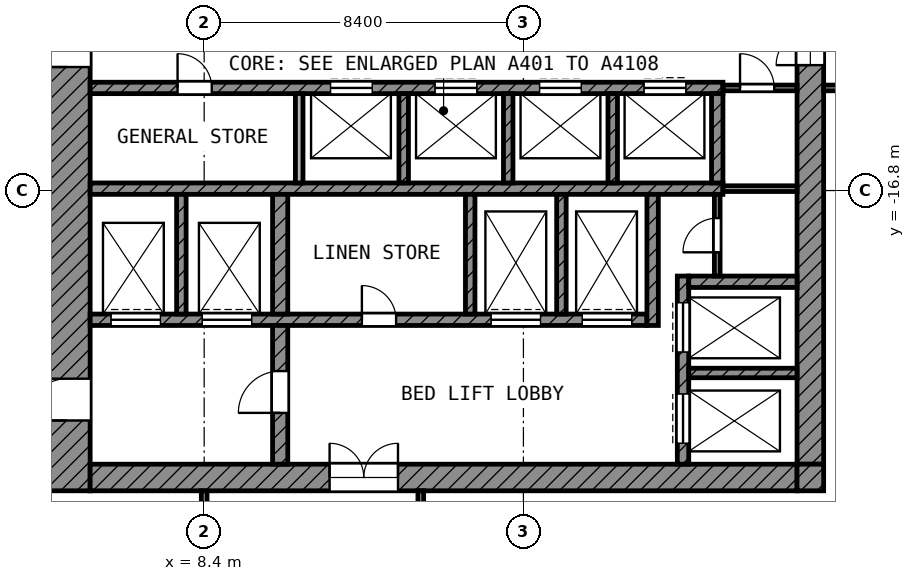
"""IFC4 building model, lengths in metres.
Left out: names, types, materials, properties, quantities, classifications, styles, units other than length and angle.
Written with IfcOpenShell. Run it as: python <this file> out.ifc"""

import sys

from ifc_helpers import new_model, si_unit, direction, frame, frame_2d, origin, place, context, subcontext, project, spatial, rectangle, extrude, element, fill, save


model = new_model("IFC4")
c1 = context("Model", 3, precision=1e-05, world=origin(), true_north=direction((0.0, 1.0)))
c2 = subcontext(c1, "Body", "Model", "MODEL_VIEW")
j1 = project(units=[si_unit("LENGTHUNIT", "METRE"), si_unit("PLANEANGLEUNIT", "RADIAN")], contexts=[c1])
p1 = place(None, origin())
s1 = spatial("IfcSite", under=j1, at=p1, CompositionType="ELEMENT")
p2 = place(p1, origin())
s2 = spatial("IfcBuilding", under=s1, at=p2, CompositionType="ELEMENT")
p3 = place(p2, frame((0.0, 0.0, 290.2)))
s3 = spatial("IfcBuildingStorey", under=s2, at=p3, CompositionType="ELEMENT", Elevation=290.2)
p4 = place(p3, frame((4.8, -24.7, 0.0), z_axis=(0.0, 0.0, 1.0), x_axis=(0.0, 1.0, 0.0)))
e1 = element("IfcWall", 1, at=p4, inside=s3, PredefinedType="SHEAR", context=c2, shape_type="SweptSolid", body=[
    extrude(rectangle(XDim=19.3, YDim=1.2, at=frame_2d((9.65, 0.0))), origin(), (0.0, 0.0, 1.0), 3.6),
])
p5 = place(p4, frame((11.15, 0.0, 0.0)))
e2 = element("IfcOpeningElement", 2, at=p5, cuts=e1, PredefinedType="OPENING", context=c2, shape_type="SweptSolid", body=[
    extrude(rectangle(XDim=1.1, YDim=2.1, at=frame_2d((0.55, 1.05))), frame((0.0, 0.61, 0.0), z_axis=(0.0, -1.0, 0.0), x_axis=(1.0, 0.0, 0.0)), (0.0, 0.0, 1.0), 1.22),
])
p6 = place(p4, frame((1.85, 0.0, 0.0)))
e3 = element("IfcOpeningElement", 3, at=p6, cuts=e1, PredefinedType="OPENING", context=c2, shape_type="SweptSolid", body=[
    extrude(rectangle(XDim=1.1, YDim=2.1, at=frame_2d((0.55, 1.05))), frame((0.0, 0.61, 0.0), z_axis=(0.0, -1.0, 0.0), x_axis=(1.0, 0.0, 0.0)), (0.0, 0.0, 1.0), 1.22),
])
p7 = place(p3, frame((24.35, -24.0, 0.0), z_axis=(0.0, 0.0, 1.0), x_axis=(0.0, 1.0, 0.0)))
e4 = element("IfcWall", 4, at=p7, inside=s3, PredefinedType="SHEAR", context=c2, shape_type="SweptSolid", body=[
    extrude(rectangle(XDim=18.6, YDim=0.7, at=frame_2d((9.3, 0.0))), origin(), (0.0, 0.0, 1.0), 3.6),
])
p8 = place(p7, frame((10.5, 0.0, 0.0)))
e5 = element("IfcOpeningElement", 5, at=p8, cuts=e4, PredefinedType="OPENING", context=c2, shape_type="SweptSolid", body=[
    extrude(rectangle(XDim=1.8, YDim=2.1, at=frame_2d((0.9, 1.05))), frame((0.0, 0.36, 0.0), z_axis=(0.0, -1.0, 0.0), x_axis=(1.0, 0.0, 0.0)), (0.0, 0.0, 1.0), 0.72),
])
p9 = place(p3, frame((5.4, -24.35, 0.0), z_axis=(0.0, 0.0, 1.0), x_axis=(1.0, 0.0, 0.0)))
e6 = element("IfcWall", 6, at=p9, inside=s3, PredefinedType="SHEAR", context=c2, shape_type="SweptSolid", body=[
    extrude(rectangle(XDim=18.6, YDim=0.7, at=frame_2d((9.3, 0.0))), origin(), (0.0, 0.0, 1.0), 3.6),
])
p10 = place(p9, frame((6.3, 0.0, 0.0)))
e7 = element("IfcOpeningElement", 7, at=p10, cuts=e6, PredefinedType="OPENING", context=c2, shape_type="SweptSolid", body=[
    extrude(rectangle(XDim=1.8, YDim=2.1, at=frame_2d((0.9, 1.05))), frame((0.0, 0.36, 0.0), z_axis=(0.0, -1.0, 0.0), x_axis=(1.0, 0.0, 0.0)), (0.0, 0.0, 1.0), 0.72),
])
p11 = place(p3, frame((24.35, -24.7, 0.0), z_axis=(0.0, 0.0, 1.0), x_axis=(0.0, 1.0, 0.0)))
e8 = element("IfcWall", 8, at=p11, inside=s3, PredefinedType="SHEAR", context=c2, shape_type="SweptSolid", body=[
    extrude(rectangle(XDim=0.7, YDim=0.7, at=frame_2d((0.35, 0.0))), origin(), (0.0, 0.0, 1.0), 3.6),
])
p12 = place(p3, frame((5.4, -14.1, 0.0), z_axis=(0.0, 0.0, 1.0), x_axis=(1.0, 0.0, 0.0)))
e9 = element("IfcWall", 9, at=p12, inside=s3, PredefinedType="SHEAR", context=c2, shape_type="SweptSolid", body=[
    extrude(rectangle(XDim=16.65, YDim=0.3, at=frame_2d((8.325, 0.0))), origin(), (0.0, 0.0, 1.0), 3.6),
])
p13 = place(p12, frame((6.325, 0.0, 0.0)))
e10 = element("IfcOpeningElement", 10, at=p13, cuts=e9, PredefinedType="OPENING", context=c2, shape_type="SweptSolid", body=[
    extrude(rectangle(XDim=1.1, YDim=2.1, at=frame_2d((0.55, 1.05))), frame((0.0, 0.16, 0.0), z_axis=(0.0, -1.0, 0.0), x_axis=(1.0, 0.0, 0.0)), (0.0, 0.0, 1.0), 0.32),
])
p14 = place(p12, frame((9.075, 0.0, 0.0)))
e11 = element("IfcOpeningElement", 11, at=p14, cuts=e9, PredefinedType="OPENING", context=c2, shape_type="SweptSolid", body=[
    extrude(rectangle(XDim=1.1, YDim=2.1, at=frame_2d((0.55, 1.05))), frame((0.0, 0.16, 0.0), z_axis=(0.0, -1.0, 0.0), x_axis=(1.0, 0.0, 0.0)), (0.0, 0.0, 1.0), 0.32),
])
p15 = place(p12, frame((11.825, 0.0, 0.0)))
e12 = element("IfcOpeningElement", 12, at=p15, cuts=e9, PredefinedType="OPENING", context=c2, shape_type="SweptSolid", body=[
    extrude(rectangle(XDim=1.1, YDim=2.1, at=frame_2d((0.55, 1.05))), frame((0.0, 0.16, 0.0), z_axis=(0.0, -1.0, 0.0), x_axis=(1.0, 0.0, 0.0)), (0.0, 0.0, 1.0), 0.32),
])
p16 = place(p12, frame((14.575, 0.0, 0.0)))
e13 = element("IfcOpeningElement", 13, at=p16, cuts=e9, PredefinedType="OPENING", context=c2, shape_type="SweptSolid", body=[
    extrude(rectangle(XDim=1.1, YDim=2.1, at=frame_2d((0.55, 1.05))), frame((0.0, 0.16, 0.0), z_axis=(0.0, -1.0, 0.0), x_axis=(1.0, 0.0, 0.0)), (0.0, 0.0, 1.0), 0.32),
])
p17 = place(p12, frame((2.3, 0.0, 0.0)))
e14 = element("IfcOpeningElement", 14, at=p17, cuts=e9, PredefinedType="OPENING", context=c2, shape_type="SweptSolid", body=[
    extrude(rectangle(XDim=0.9, YDim=2.1, at=frame_2d((0.45, 1.05))), frame((0.0, 0.16, 0.0), z_axis=(0.0, -1.0, 0.0), x_axis=(1.0, 0.0, 0.0)), (0.0, 0.0, 1.0), 0.32),
])
p18 = place(p3, frame((5.4, -16.75, 0.0), z_axis=(0.0, 0.0, 1.0), x_axis=(1.0, 0.0, 0.0)))
e15 = element("IfcWall", 15, at=p18, inside=s3, PredefinedType="SHEAR", context=c2, shape_type="SweptSolid", body=[
    extrude(rectangle(XDim=16.65, YDim=0.3, at=frame_2d((8.325, 0.0))), origin(), (0.0, 0.0, 1.0), 3.6),
])
p19 = place(p3, frame((5.4, -20.2, 0.0), z_axis=(0.0, 0.0, 1.0), x_axis=(1.0, 0.0, 0.0)))
e16 = element("IfcWall", 16, at=p19, inside=s3, PredefinedType="SHEAR", context=c2, shape_type="SweptSolid", body=[
    extrude(rectangle(XDim=14.65, YDim=0.3, at=frame_2d((7.325, 0.0))), origin(), (0.0, 0.0, 1.0), 3.6),
])
p20 = place(p19, frame((10.55, 0.0, 0.0)))
e17 = element("IfcOpeningElement", 17, at=p20, cuts=e16, PredefinedType="OPENING", context=c2, shape_type="SweptSolid", body=[
    extrude(rectangle(XDim=1.3, YDim=2.1, at=frame_2d((0.65, 1.05))), frame((0.0, 0.16, 0.0), z_axis=(0.0, -1.0, 0.0), x_axis=(1.0, 0.0, 0.0)), (0.0, 0.0, 1.0), 0.32),
])
p21 = place(p19, frame((12.95, 0.0, 0.0)))
e18 = element("IfcOpeningElement", 18, at=p21, cuts=e16, PredefinedType="OPENING", context=c2, shape_type="SweptSolid", body=[
    extrude(rectangle(XDim=1.3, YDim=2.1, at=frame_2d((0.65, 1.05))), frame((0.0, 0.16, 0.0), z_axis=(0.0, -1.0, 0.0), x_axis=(1.0, 0.0, 0.0)), (0.0, 0.0, 1.0), 0.32),
])
p22 = place(p19, frame((0.55, 0.0, 0.0)))
e19 = element("IfcOpeningElement", 19, at=p22, cuts=e16, PredefinedType="OPENING", context=c2, shape_type="SweptSolid", body=[
    extrude(rectangle(XDim=1.3, YDim=2.1, at=frame_2d((0.65, 1.05))), frame((0.0, 0.16, 0.0), z_axis=(0.0, -1.0, 0.0), x_axis=(1.0, 0.0, 0.0)), (0.0, 0.0, 1.0), 0.32),
])
p23 = place(p19, frame((2.95, 0.0, 0.0)))
e20 = element("IfcOpeningElement", 20, at=p23, cuts=e16, PredefinedType="OPENING", context=c2, shape_type="SweptSolid", body=[
    extrude(rectangle(XDim=1.3, YDim=2.1, at=frame_2d((0.65, 1.05))), frame((0.0, 0.16, 0.0), z_axis=(0.0, -1.0, 0.0), x_axis=(1.0, 0.0, 0.0)), (0.0, 0.0, 1.0), 0.32),
])
p24 = place(p19, frame((7.15, 0.0, 0.0)))
e21 = element("IfcOpeningElement", 21, at=p24, cuts=e16, PredefinedType="OPENING", context=c2, shape_type="SweptSolid", body=[
    extrude(rectangle(XDim=0.9, YDim=2.1, at=frame_2d((0.45, 1.05))), frame((0.0, 0.16, 0.0), z_axis=(0.0, -1.0, 0.0), x_axis=(1.0, 0.0, 0.0)), (0.0, 0.0, 1.0), 0.32),
])
p25 = place(p3, frame((10.4, -24.0, 0.0), z_axis=(0.0, 0.0, 1.0), x_axis=(0.0, 1.0, 0.0)))
e22 = element("IfcWall", 22, at=p25, inside=s3, PredefinedType="SHEAR", context=c2, shape_type="SweptSolid", body=[
    extrude(rectangle(XDim=3.65, YDim=0.4, at=frame_2d((1.825, 0.0))), origin(), (0.0, 0.0, 1.0), 3.6),
])
p26 = place(p25, frame((1.35, 0.0, 0.0)))
e23 = element("IfcOpeningElement", 23, at=p26, cuts=e22, PredefinedType="OPENING", context=c2, shape_type="SweptSolid", body=[
    extrude(rectangle(XDim=1.1, YDim=2.1, at=frame_2d((0.55, 1.05))), frame((0.0, 0.21, 0.0), z_axis=(0.0, -1.0, 0.0), x_axis=(1.0, 0.0, 0.0)), (0.0, 0.0, 1.0), 0.42),
])
p27 = place(p3, frame((10.4, -20.05, 0.0), z_axis=(0.0, 0.0, 1.0), x_axis=(0.0, 1.0, 0.0)))
e24 = element("IfcWall", 24, at=p27, inside=s3, PredefinedType="SHEAR", context=c2, shape_type="SweptSolid", body=[
    extrude(rectangle(XDim=3.15, YDim=0.4, at=frame_2d((1.575, 0.0))), origin(), (0.0, 0.0, 1.0), 3.6),
])
p28 = place(p3, frame((20.2, -20.35, 0.0), z_axis=(0.0, 0.0, 1.0), x_axis=(0.0, 1.0, 0.0)))
e25 = element("IfcWall", 25, at=p28, inside=s3, PredefinedType="SHEAR", context=c2, shape_type="SweptSolid", body=[
    extrude(rectangle(XDim=3.45, YDim=0.3, at=frame_2d((1.725, 0.0))), origin(), (0.0, 0.0, 1.0), 3.6),
])
p29 = place(p3, frame((21.9, -16.6, 0.0), z_axis=(0.0, 0.0, 1.0), x_axis=(0.0, 1.0, 0.0)))
e26 = element("IfcWall", 26, at=p29, inside=s3, PredefinedType="SHEAR", context=c2, shape_type="SweptSolid", body=[
    extrude(rectangle(XDim=2.35, YDim=0.3, at=frame_2d((1.175, 0.0))), origin(), (0.0, 0.0, 1.0), 3.6),
])
p30 = place(p3, frame((21.15, -19.2, 0.0), z_axis=(0.0, 0.0, 1.0), x_axis=(1.0, 0.0, 0.0)))
e27 = element("IfcWall", 27, at=p30, inside=s3, PredefinedType="SHEAR", context=c2, shape_type="SweptSolid", body=[
    extrude(rectangle(XDim=2.85, YDim=0.3, at=frame_2d((1.425, 0.0))), origin(), (0.0, 0.0, 1.0), 3.6),
])
p31 = place(p3, frame((21.0, -24.0, 0.0), z_axis=(0.0, 0.0, 1.0), x_axis=(0.0, 1.0, 0.0)))
e28 = element("IfcWall", 28, at=p31, inside=s3, PredefinedType="SHEAR", context=c2, shape_type="SweptSolid", body=[
    extrude(rectangle(XDim=4.95, YDim=0.3, at=frame_2d((2.475, 0.0))), origin(), (0.0, 0.0, 1.0), 3.6),
])
p32 = place(p31, frame((2.95, 0.0, 0.0)))
e29 = element("IfcOpeningElement", 29, at=p32, cuts=e28, PredefinedType="OPENING", context=c2, shape_type="SweptSolid", body=[
    extrude(rectangle(XDim=1.3, YDim=2.1, at=frame_2d((0.65, 1.05))), frame((0.0, 0.16, 0.0), z_axis=(0.0, -1.0, 0.0), x_axis=(1.0, 0.0, 0.0)), (0.0, 0.0, 1.0), 0.32),
])
p33 = place(p31, frame((0.55, 0.0, 0.0)))
e30 = element("IfcOpeningElement", 30, at=p33, cuts=e28, PredefinedType="OPENING", context=c2, shape_type="SweptSolid", body=[
    extrude(rectangle(XDim=1.3, YDim=2.1, at=frame_2d((0.65, 1.05))), frame((0.0, 0.16, 0.0), z_axis=(0.0, -1.0, 0.0), x_axis=(1.0, 0.0, 0.0)), (0.0, 0.0, 1.0), 0.32),
])
p34 = place(p3, frame((21.15, -21.6, 0.0), z_axis=(0.0, 0.0, 1.0), x_axis=(1.0, 0.0, 0.0)))
e31 = element("IfcWall", 31, at=p34, inside=s3, PredefinedType="SHEAR", context=c2, shape_type="SweptSolid", body=[
    extrude(rectangle(XDim=2.85, YDim=0.25, at=frame_2d((1.425, 0.0))), origin(), (0.0, 0.0, 1.0), 3.6),
])
for number, where, z_axis, x_axis in (
    (32, (7.8, -20.05, 0.0), (0.0, 0.0, 1.0), (0.0, 1.0, 0.0)),
    (33, (15.4, -20.05, 0.0), (0.0, 0.0, 1.0), (0.0, 1.0, 0.0)),
    (34, (17.8, -20.05, 0.0), (0.0, 0.0, 1.0), (0.0, 1.0, 0.0)),
):
    element("IfcWall", number, at=place(p3, frame(where, z_axis=z_axis, x_axis=x_axis)), inside=s3, PredefinedType="SHEAR", context=c2, shape_type="SweptSolid", body=[
        extrude(rectangle(XDim=3.15, YDim=0.25, at=frame_2d((1.575, 0.0))), origin(), (0.0, 0.0, 1.0), 3.6),
    ])
p35 = place(p3, frame((10.9, -16.6, 0.0), z_axis=(0.0, 0.0, 1.0), x_axis=(0.0, 1.0, 0.0)))
e35 = element("IfcWall", 35, at=p35, inside=s3, PredefinedType="PARTITIONING", context=c2, shape_type="SweptSolid", body=[
    extrude(rectangle(XDim=2.35, YDim=0.2, at=frame_2d((1.175, 0.0))), origin(), (0.0, 0.0, 1.0), 3.6),
])
for number, where, z_axis, x_axis in (
    (36, (13.65, -16.6, 0.0), (0.0, 0.0, 1.0), (0.0, 1.0, 0.0)),
    (37, (16.4, -16.6, 0.0), (0.0, 0.0, 1.0), (0.0, 1.0, 0.0)),
    (38, (19.15, -16.6, 0.0), (0.0, 0.0, 1.0), (0.0, 1.0, 0.0)),
):
    element("IfcWall", number, at=place(p3, frame(where, z_axis=z_axis, x_axis=x_axis)), inside=s3, PredefinedType="SHEAR", context=c2, shape_type="SweptSolid", body=[
        extrude(rectangle(XDim=2.35, YDim=0.25, at=frame_2d((1.175, 0.0))), origin(), (0.0, 0.0, 1.0), 3.6),
    ])
p36 = place(p3, frame((21.9, -19.05, 0.0), z_axis=(0.0, 0.0, 1.0), x_axis=(0.0, 1.0, 0.0)))
e39 = element("IfcWall", 39, at=p36, inside=s3, PredefinedType="PARTITIONING", context=c2, shape_type="SweptSolid", body=[
    extrude(rectangle(XDim=2.15, YDim=0.15, at=frame_2d((1.075, 0.0))), origin(), (0.0, 0.0, 1.0), 3.6),
])
p37 = place(p36, frame((0.625, 0.0, 0.0)))
e40 = element("IfcOpeningElement", 40, at=p37, cuts=e39, PredefinedType="OPENING", context=c2, shape_type="SweptSolid", body=[
    extrude(rectangle(XDim=0.9, YDim=2.1, at=frame_2d((0.45, 1.05))), frame((0.0, 0.085, 0.0), z_axis=(0.0, -1.0, 0.0), x_axis=(1.0, 0.0, 0.0)), (0.0, 0.0, 1.0), 0.17),
])
p38 = place(p3, frame((22.05, -16.75, 0.0), z_axis=(0.0, 0.0, 1.0), x_axis=(1.0, 0.0, 0.0)))
e41 = element("IfcWall", 41, at=p38, inside=s3, PredefinedType="PARTITIONING", context=c2, shape_type="SweptSolid", body=[
    extrude(rectangle(XDim=1.95, YDim=0.15, at=frame_2d((0.975, 0.0))), origin(), (0.0, 0.0, 1.0), 3.6),
])
p39 = place(p3, frame((22.05, -14.1, 0.0), z_axis=(0.0, 0.0, 1.0), x_axis=(1.0, 0.0, 0.0)))
e42 = element("IfcWall", 42, at=p39, inside=s3, PredefinedType="PARTITIONING", context=c2, shape_type="SweptSolid", body=[
    extrude(rectangle(XDim=1.95, YDim=0.15, at=frame_2d((0.975, 0.0))), origin(), (0.0, 0.0, 1.0), 3.6),
])
p40 = place(p39, frame((0.45, 0.0, 0.0)))
e43 = element("IfcOpeningElement", 43, at=p40, cuts=e42, PredefinedType="OPENING", context=c2, shape_type="SweptSolid", body=[
    extrude(rectangle(XDim=0.9, YDim=2.1, at=frame_2d((0.45, 1.05))), frame((0.0, 0.085, 0.0), z_axis=(0.0, -1.0, 0.0), x_axis=(1.0, 0.0, 0.0)), (0.0, 0.0, 1.0), 0.17),
])
p41 = place(p3, frame((24.7, -14.1, 0.0), z_axis=(0.0, 0.0, 1.0), x_axis=(1.0, 0.0, 0.0)))
e44 = element("IfcWall", 44, at=p41, inside=s3, PredefinedType="PARTITIONING", context=c2, shape_type="SweptSolid", body=[
    extrude(rectangle(XDim=4.625, YDim=0.15, at=frame_2d((2.312, 0.0))), origin(), (0.0, 0.0, 1.0), 3.6),
])
p42 = place(p41, frame((1.85, 0.0, 0.0)))
e45 = element("IfcOpeningElement", 45, at=p42, cuts=e44, PredefinedType="OPENING", context=c2, shape_type="SweptSolid", body=[
    extrude(rectangle(XDim=1.5, YDim=2.1, at=frame_2d((0.75, 1.05))), frame((0.0, 0.085, 0.0), z_axis=(0.0, -1.0, 0.0), x_axis=(1.0, 0.0, 0.0)), (0.0, 0.0, 1.0), 0.17),
])
p43 = place(p3, frame((8.4, -31.957, 0.0), z_axis=(0.0, 0.0, 1.0), x_axis=(0.0, 1.0, 0.0)))
e46 = element("IfcWall", 46, at=p43, inside=s3, PredefinedType="PARTITIONING", context=c2, shape_type="SweptSolid", body=[
    extrude(rectangle(XDim=7.257, YDim=0.15, at=frame_2d((3.628, 0.0))), origin(), (0.0, 0.0, 1.0), 3.6),
])
p44 = place(p43, frame((4.007, 0.0, 0.0)))
e47 = element("IfcOpeningElement", 47, at=p44, cuts=e46, PredefinedType="OPENING", context=c2, shape_type="SweptSolid", body=[
    extrude(rectangle(XDim=1.0, YDim=2.1, at=frame_2d((0.5, 1.05))), frame((0.0, 0.085, 0.0), z_axis=(0.0, -1.0, 0.0), x_axis=(1.0, 0.0, 0.0)), (0.0, 0.0, 1.0), 0.17),
])
p45 = place(p3, frame((14.1, -29.325, 0.0), z_axis=(0.0, 0.0, 1.0), x_axis=(0.0, 1.0, 0.0)))
e48 = element("IfcWall", 48, at=p45, inside=s3, PredefinedType="PARTITIONING", context=c2, shape_type="SweptSolid", body=[
    extrude(rectangle(XDim=4.625, YDim=0.15, at=frame_2d((2.312, 0.0))), origin(), (0.0, 0.0, 1.0), 3.6),
])
p46 = place(p13, origin())
e49 = element("IfcDoor", 49, at=p46, inside=s3, OperationType="DOUBLE_DOOR_SLIDING", PredefinedType="DOOR", context=c2, shape_type="SweptSolid", body=[
    extrude(rectangle(XDim=1.1, YDim=2.1, at=frame_2d((0.55, 1.05))), frame((0.0, 0.025, 0.0), z_axis=(0.0, -1.0, 0.0), x_axis=(1.0, 0.0, 0.0)), (0.0, 0.0, 1.0), 0.05),
])
fill(e10, e49)
p47 = place(p14, origin())
e50 = element("IfcDoor", 50, at=p47, inside=s3, OperationType="DOUBLE_DOOR_SLIDING", PredefinedType="DOOR", context=c2, shape_type="SweptSolid", body=[
    extrude(rectangle(XDim=1.1, YDim=2.1, at=frame_2d((0.55, 1.05))), frame((0.0, 0.025, 0.0), z_axis=(0.0, -1.0, 0.0), x_axis=(1.0, 0.0, 0.0)), (0.0, 0.0, 1.0), 0.05),
])
fill(e11, e50)
p48 = place(p15, origin())
e51 = element("IfcDoor", 51, at=p48, inside=s3, OperationType="DOUBLE_DOOR_SLIDING", PredefinedType="DOOR", context=c2, shape_type="SweptSolid", body=[
    extrude(rectangle(XDim=1.1, YDim=2.1, at=frame_2d((0.55, 1.05))), frame((0.0, 0.025, 0.0), z_axis=(0.0, -1.0, 0.0), x_axis=(1.0, 0.0, 0.0)), (0.0, 0.0, 1.0), 0.05),
])
fill(e12, e51)
p49 = place(p16, origin())
e52 = element("IfcDoor", 52, at=p49, inside=s3, OperationType="DOUBLE_DOOR_SLIDING", PredefinedType="DOOR", context=c2, shape_type="SweptSolid", body=[
    extrude(rectangle(XDim=1.1, YDim=2.1, at=frame_2d((0.55, 1.05))), frame((0.0, 0.025, 0.0), z_axis=(0.0, -1.0, 0.0), x_axis=(1.0, 0.0, 0.0)), (0.0, 0.0, 1.0), 0.05),
])
fill(e13, e52)
p50 = place(p32, origin())
e53 = element("IfcDoor", 53, at=p50, inside=s3, OperationType="DOUBLE_DOOR_SLIDING", PredefinedType="DOOR", context=c2, shape_type="SweptSolid", body=[
    extrude(rectangle(XDim=1.3, YDim=2.1, at=frame_2d((0.65, 1.05))), frame((0.0, 0.025, 0.0), z_axis=(0.0, -1.0, 0.0), x_axis=(1.0, 0.0, 0.0)), (0.0, 0.0, 1.0), 0.05),
])
fill(e29, e53)
p51 = place(p33, origin())
e54 = element("IfcDoor", 54, at=p51, inside=s3, OperationType="DOUBLE_DOOR_SLIDING", PredefinedType="DOOR", context=c2, shape_type="SweptSolid", body=[
    extrude(rectangle(XDim=1.3, YDim=2.1, at=frame_2d((0.65, 1.05))), frame((0.0, 0.025, 0.0), z_axis=(0.0, -1.0, 0.0), x_axis=(1.0, 0.0, 0.0)), (0.0, 0.0, 1.0), 0.05),
])
fill(e30, e54)
p52 = place(p20, origin())
e55 = element("IfcDoor", 55, at=p52, inside=s3, OperationType="DOUBLE_DOOR_SLIDING", PredefinedType="DOOR", context=c2, shape_type="SweptSolid", body=[
    extrude(rectangle(XDim=1.3, YDim=2.1, at=frame_2d((0.65, 1.05))), frame((0.0, 0.025, 0.0), z_axis=(0.0, -1.0, 0.0), x_axis=(1.0, 0.0, 0.0)), (0.0, 0.0, 1.0), 0.05),
])
fill(e17, e55)
p53 = place(p21, origin())
e56 = element("IfcDoor", 56, at=p53, inside=s3, OperationType="DOUBLE_DOOR_SLIDING", PredefinedType="DOOR", context=c2, shape_type="SweptSolid", body=[
    extrude(rectangle(XDim=1.3, YDim=2.1, at=frame_2d((0.65, 1.05))), frame((0.0, 0.025, 0.0), z_axis=(0.0, -1.0, 0.0), x_axis=(1.0, 0.0, 0.0)), (0.0, 0.0, 1.0), 0.05),
])
fill(e18, e56)
p54 = place(p22, origin())
e57 = element("IfcDoor", 57, at=p54, inside=s3, OperationType="DOUBLE_DOOR_SLIDING", PredefinedType="DOOR", context=c2, shape_type="SweptSolid", body=[
    extrude(rectangle(XDim=1.3, YDim=2.1, at=frame_2d((0.65, 1.05))), frame((0.0, 0.025, 0.0), z_axis=(0.0, -1.0, 0.0), x_axis=(1.0, 0.0, 0.0)), (0.0, 0.0, 1.0), 0.05),
])
fill(e19, e57)
p55 = place(p23, origin())
e58 = element("IfcDoor", 58, at=p55, inside=s3, OperationType="DOUBLE_DOOR_SLIDING", PredefinedType="DOOR", context=c2, shape_type="SweptSolid", body=[
    extrude(rectangle(XDim=1.3, YDim=2.1, at=frame_2d((0.65, 1.05))), frame((0.0, 0.025, 0.0), z_axis=(0.0, -1.0, 0.0), x_axis=(1.0, 0.0, 0.0)), (0.0, 0.0, 1.0), 0.05),
])
fill(e20, e58)
p56 = place(p5, origin())
e59 = element("IfcDoor", 59, at=p56, inside=s3, OperationType="SINGLE_SWING_LEFT", PredefinedType="DOOR", context=c2, shape_type="SweptSolid", body=[
    extrude(rectangle(XDim=1.1, YDim=2.1, at=frame_2d((0.55, 1.05))), frame((0.0, 0.025, 0.0), z_axis=(0.0, -1.0, 0.0), x_axis=(1.0, 0.0, 0.0)), (0.0, 0.0, 1.0), 0.05),
])
fill(e2, e59)
p57 = place(p6, origin())
e60 = element("IfcDoor", 60, at=p57, inside=s3, OperationType="SINGLE_SWING_LEFT", PredefinedType="DOOR", context=c2, shape_type="SweptSolid", body=[
    extrude(rectangle(XDim=1.1, YDim=2.1, at=frame_2d((0.55, 1.05))), frame((0.0, 0.025, 0.0), z_axis=(0.0, -1.0, 0.0), x_axis=(1.0, 0.0, 0.0)), (0.0, 0.0, 1.0), 0.05),
])
fill(e3, e60)
p58 = place(p26, origin())
e61 = element("IfcDoor", 61, at=p58, inside=s3, OperationType="SINGLE_SWING_LEFT", PredefinedType="DOOR", context=c2, shape_type="SweptSolid", body=[
    extrude(rectangle(XDim=1.1, YDim=2.1, at=frame_2d((0.55, 1.05))), frame((0.0, 0.025, 0.0), z_axis=(0.0, -1.0, 0.0), x_axis=(1.0, 0.0, 0.0)), (0.0, 0.0, 1.0), 0.05),
])
fill(e23, e61)
p59 = place(p8, origin())
e62 = element("IfcDoor", 62, at=p59, inside=s3, OperationType="DOUBLE_DOOR_SINGLE_SWING", PredefinedType="DOOR", context=c2, shape_type="SweptSolid", body=[
    extrude(rectangle(XDim=1.8, YDim=2.1, at=frame_2d((0.9, 1.05))), frame((0.0, 0.025, 0.0), z_axis=(0.0, -1.0, 0.0), x_axis=(1.0, 0.0, 0.0)), (0.0, 0.0, 1.0), 0.05),
])
fill(e5, e62)
p60 = place(p10, origin())
e63 = element("IfcDoor", 63, at=p60, inside=s3, OperationType="DOUBLE_DOOR_SINGLE_SWING", PredefinedType="DOOR", context=c2, shape_type="SweptSolid", body=[
    extrude(rectangle(XDim=1.8, YDim=2.1, at=frame_2d((0.9, 1.05))), frame((0.0, 0.025, 0.0), z_axis=(0.0, -1.0, 0.0), x_axis=(1.0, 0.0, 0.0)), (0.0, 0.0, 1.0), 0.05),
])
fill(e7, e63)
p61 = place(p40, origin())
e64 = element("IfcDoor", 64, at=p61, inside=s3, OperationType="SINGLE_SWING_LEFT", PredefinedType="DOOR", context=c2, shape_type="SweptSolid", body=[
    extrude(rectangle(XDim=0.9, YDim=2.1, at=frame_2d((0.45, 1.05))), frame((0.0, 0.025, 0.0), z_axis=(0.0, -1.0, 0.0), x_axis=(1.0, 0.0, 0.0)), (0.0, 0.0, 1.0), 0.05),
])
fill(e43, e64)
p62 = place(p37, origin())
e65 = element("IfcDoor", 65, at=p62, inside=s3, OperationType="SINGLE_SWING_LEFT", PredefinedType="DOOR", context=c2, shape_type="SweptSolid", body=[
    extrude(rectangle(XDim=0.9, YDim=2.1, at=frame_2d((0.45, 1.05))), frame((0.0, 0.025, 0.0), z_axis=(0.0, -1.0, 0.0), x_axis=(1.0, 0.0, 0.0)), (0.0, 0.0, 1.0), 0.05),
])
fill(e40, e65)
p63 = place(p24, origin())
e66 = element("IfcDoor", 66, at=p63, inside=s3, OperationType="SINGLE_SWING_LEFT", PredefinedType="DOOR", context=c2, shape_type="SweptSolid", body=[
    extrude(rectangle(XDim=0.9, YDim=2.1, at=frame_2d((0.45, 1.05))), frame((0.0, 0.025, 0.0), z_axis=(0.0, -1.0, 0.0), x_axis=(1.0, 0.0, 0.0)), (0.0, 0.0, 1.0), 0.05),
])
fill(e21, e66)
p64 = place(p17, origin())
e67 = element("IfcDoor", 67, at=p64, inside=s3, OperationType="SINGLE_SWING_LEFT", PredefinedType="DOOR", context=c2, shape_type="SweptSolid", body=[
    extrude(rectangle(XDim=0.9, YDim=2.1, at=frame_2d((0.45, 1.05))), frame((0.0, 0.025, 0.0), z_axis=(0.0, -1.0, 0.0), x_axis=(1.0, 0.0, 0.0)), (0.0, 0.0, 1.0), 0.05),
])
fill(e14, e67)
save(model, sys.argv[1])
